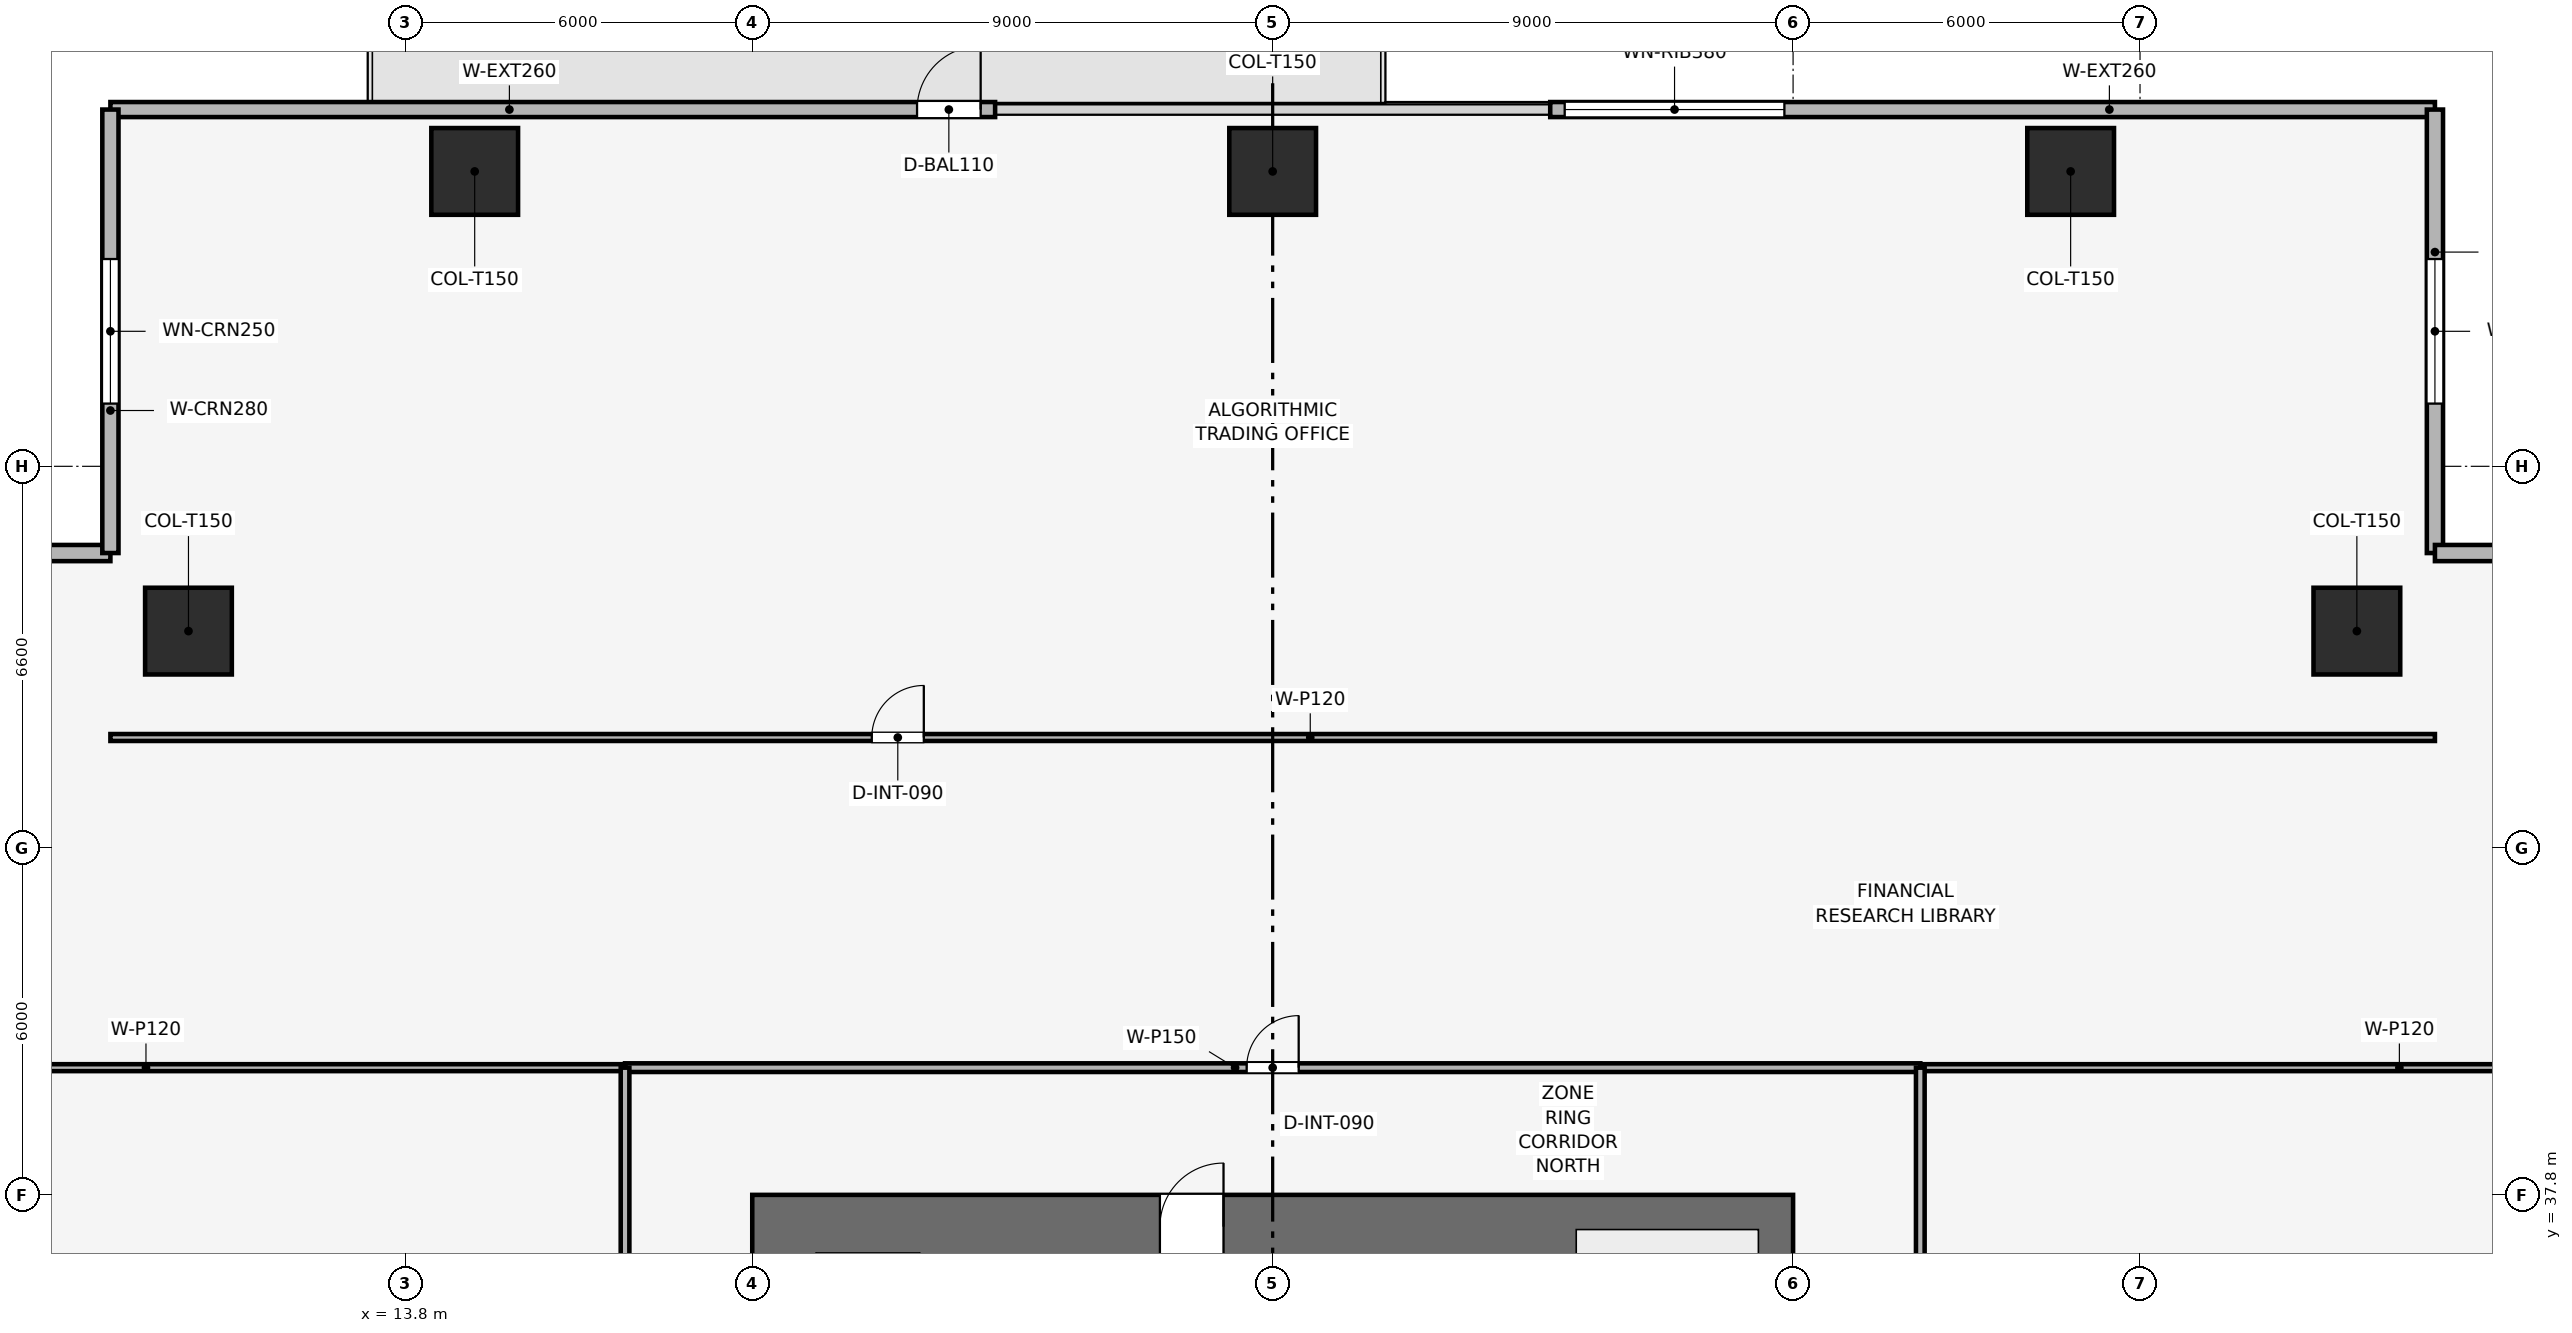
"""IFC4 building model, lengths in metres.
Left out: names, types, materials, properties, quantities, classifications, styles, units other than length and angle.
Written with IfcOpenShell. Run it as: python <this file> out.ifc"""

import sys

from ifc_helpers import new_model, si_unit, direction, frame, frame_2d, origin, origin_2d, place, context, subcontext, project, spatial, rectangle, extrude, element, fill, save


model = new_model("IFC4")
c1 = context("Model", 3, precision=1e-05, world=origin(), true_north=direction((0.0, 1.0)))
c2 = subcontext(c1, "Body", "Model", "MODEL_VIEW")
j1 = project(units=[si_unit("LENGTHUNIT", "METRE"), si_unit("PLANEANGLEUNIT", "RADIAN")], contexts=[c1])
p1 = place(None, origin())
s1 = spatial("IfcSite", under=j1, at=p1, CompositionType="ELEMENT")
p2 = place(p1, origin())
s2 = spatial("IfcBuilding", under=s1, at=p2, CompositionType="ELEMENT")
p3 = place(p2, frame((0.0, 0.0, 92.4)))
s3 = spatial("IfcBuildingStorey", under=s2, at=p3, CompositionType="ELEMENT", Elevation=92.4)
p4 = place(p3, frame((19.8, 37.25, 0.0), z_axis=(0.0, 0.0, 1.0), x_axis=(1.0, 0.0, 0.0)))
e1 = element("IfcWall", 1, at=p4, inside=s3, PredefinedType="SHEAR", context=c2, shape_type="SweptSolid", body=[
    extrude(rectangle(XDim=18.0, YDim=1.1, at=frame_2d((9.0, 0.0))), origin(), (0.0, 0.0, 1.0), 3.9),
])
p5 = place(p4, frame((7.05, 0.0, 0.0)))
e2 = element("IfcOpeningElement", 2, at=p5, cuts=e1, PredefinedType="OPENING", context=c2, shape_type="SweptSolid", body=[
    extrude(rectangle(XDim=1.1, YDim=2.15, at=frame_2d((0.55, 1.075))), frame((0.0, 0.56, 0.0), z_axis=(0.0, -1.0, 0.0), x_axis=(1.0, 0.0, 0.0)), (0.0, 0.0, 1.0), 1.12),
])
for number, where, z_axis, x_axis in (
    (3, (42.6, 55.5, 0.003), (0.0, 0.0, 1.0), (1.0, 0.0, 0.0)),
    (4, (28.8, 55.5, 0.003), (0.0, 0.0, 1.0), (1.0, 0.0, 0.0)),
    (5, (15.0, 55.5, 0.003), (0.0, 0.0, 1.0), (1.0, 0.0, 0.0)),
    (6, (47.55, 47.55, 0.003), (0.0, 0.0, 1.0), (1.0, 0.0, 0.0)),
    (7, (10.05, 47.55, 0.003), (0.0, 0.0, 1.0), (1.0, 0.0, 0.0)),
):
    element("IfcColumn", number, at=place(p3, frame(where, z_axis=z_axis, x_axis=x_axis)), inside=s3, PredefinedType="COLUMN", context=c2, shape_type="SweptSolid", body=[
        extrude(rectangle(XDim=1.5, YDim=1.5, at=origin_2d()), origin(), (0.0, 0.0, 1.0), 3.644),
    ])
p6 = place(p3, frame((8.7, 56.57, 0.0), z_axis=(0.0, 0.0, 1.0), x_axis=(1.0, 0.0, 0.0)))
e8 = element("IfcWall", 8, at=p6, inside=s3, PredefinedType="SOLIDWALL", context=c2, shape_type="SweptSolid", body=[
    extrude(rectangle(XDim=15.3, YDim=0.26, at=frame_2d((7.65, 0.0))), origin(), (0.0, 0.0, 1.0), 3.65),
])
p7 = place(p6, frame((13.95, 0.0, 0.0)))
e9 = element("IfcOpeningElement", 9, at=p7, cuts=e8, PredefinedType="OPENING", context=c2, shape_type="SweptSolid", body=[
    extrude(rectangle(XDim=1.1, YDim=2.2, at=frame_2d((0.55, 1.1))), frame((0.0, 0.14, 0.0), z_axis=(0.0, -1.0, 0.0), x_axis=(1.0, 0.0, 0.0)), (0.0, 0.0, 1.0), 0.28),
])
p8 = place(p3, frame((33.6, 56.57, 0.0), z_axis=(0.0, 0.0, 1.0), x_axis=(1.0, 0.0, 0.0)))
e10 = element("IfcWall", 10, at=p8, inside=s3, PredefinedType="SOLIDWALL", context=c2, shape_type="SweptSolid", body=[
    extrude(rectangle(XDim=15.3, YDim=0.26, at=frame_2d((7.65, 0.0))), origin(), (0.0, 0.0, 1.0), 3.65),
])
p9 = place(p8, frame((0.25, 0.0, 0.9)))
e11 = element("IfcOpeningElement", 11, at=p9, cuts=e10, PredefinedType="OPENING", context=c2, shape_type="SweptSolid", body=[
    extrude(rectangle(XDim=3.8, YDim=1.9, at=frame_2d((1.9, 0.95))), frame((0.0, 0.14, 0.0), z_axis=(0.0, -1.0, 0.0), x_axis=(1.0, 0.0, 0.0)), (0.0, 0.0, 1.0), 0.28),
])
p10 = place(p3, frame((1.03, 48.9, 0.0), z_axis=(0.0, 0.0, 1.0), x_axis=(1.0, 0.0, 0.0)))
e12 = element("IfcWall", 12, at=p10, inside=s3, PredefinedType="SOLIDWALL", context=c2, shape_type="SweptSolid", body=[
    extrude(rectangle(XDim=7.67, YDim=0.28, at=frame_2d((3.835, 0.0))), origin(), (0.0, 0.0, 1.0), 3.65),
])
p11 = place(p10, frame((2.585, 0.0, 0.9)))
e13 = element("IfcOpeningElement", 13, at=p11, cuts=e12, PredefinedType="OPENING", context=c2, shape_type="SweptSolid", body=[
    extrude(rectangle(XDim=2.5, YDim=1.9, at=frame_2d((1.25, 0.95))), frame((0.0, 0.15, 0.0), z_axis=(0.0, -1.0, 0.0), x_axis=(1.0, 0.0, 0.0)), (0.0, 0.0, 1.0), 0.3),
])
p12 = place(p3, frame((8.7, 48.9, 0.0), z_axis=(0.0, 0.0, 1.0), x_axis=(0.0, 1.0, 0.0)))
e14 = element("IfcWall", 14, at=p12, inside=s3, PredefinedType="SOLIDWALL", context=c2, shape_type="SweptSolid", body=[
    extrude(rectangle(XDim=7.67, YDim=0.28, at=frame_2d((3.835, 0.0))), origin(), (0.0, 0.0, 1.0), 3.65),
])
p13 = place(p12, frame((2.585, 0.0, 0.9)))
e15 = element("IfcOpeningElement", 15, at=p13, cuts=e14, PredefinedType="OPENING", context=c2, shape_type="SweptSolid", body=[
    extrude(rectangle(XDim=2.5, YDim=1.9, at=frame_2d((1.25, 0.95))), frame((0.0, 0.15, 0.0), z_axis=(0.0, -1.0, 0.0), x_axis=(1.0, 0.0, 0.0)), (0.0, 0.0, 1.0), 0.3),
])
p14 = place(p3, frame((48.9, 56.57, 0.0), z_axis=(0.0, 0.0, 1.0), x_axis=(0.0, -1.0, 0.0)))
e16 = element("IfcWall", 16, at=p14, inside=s3, PredefinedType="SOLIDWALL", context=c2, shape_type="SweptSolid", body=[
    extrude(rectangle(XDim=7.67, YDim=0.28, at=frame_2d((3.835, 0.0))), origin(), (0.0, 0.0, 1.0), 3.65),
])
p15 = place(p14, frame((2.585, 0.0, 0.9)))
e17 = element("IfcOpeningElement", 17, at=p15, cuts=e16, PredefinedType="OPENING", context=c2, shape_type="SweptSolid", body=[
    extrude(rectangle(XDim=2.5, YDim=1.9, at=frame_2d((1.25, 0.95))), frame((0.0, 0.15, 0.0), z_axis=(0.0, -1.0, 0.0), x_axis=(1.0, 0.0, 0.0)), (0.0, 0.0, 1.0), 0.3),
])
p16 = place(p3, frame((48.9, 48.9, 0.0), z_axis=(0.0, 0.0, 1.0), x_axis=(1.0, 0.0, 0.0)))
e18 = element("IfcWall", 18, at=p16, inside=s3, PredefinedType="SOLIDWALL", context=c2, shape_type="SweptSolid", body=[
    extrude(rectangle(XDim=7.67, YDim=0.28, at=frame_2d((3.835, 0.0))), origin(), (0.0, 0.0, 1.0), 3.65),
])
p17 = place(p16, frame((2.585, 0.0, 0.9)))
e19 = element("IfcOpeningElement", 19, at=p17, cuts=e18, PredefinedType="OPENING", context=c2, shape_type="SweptSolid", body=[
    extrude(rectangle(XDim=2.5, YDim=1.9, at=frame_2d((1.25, 0.95))), frame((0.0, 0.15, 0.0), z_axis=(0.0, -1.0, 0.0), x_axis=(1.0, 0.0, 0.0)), (0.0, 0.0, 1.0), 0.3),
])
p18 = place(p3, frame((8.7, 45.71, 0.0), z_axis=(0.0, 0.0, 1.0), x_axis=(1.0, 0.0, 0.0)))
e20 = element("IfcWall", 20, at=p18, inside=s3, PredefinedType="PARTITIONING", context=c2, shape_type="SweptSolid", body=[
    extrude(rectangle(XDim=40.2, YDim=0.12, at=frame_2d((20.1, 0.0))), origin(), (0.0, 0.0, 1.0), 3.085),
])
p19 = place(p18, frame((13.167, 0.0, 0.0)))
e21 = element("IfcOpeningElement", 21, at=p19, cuts=e20, PredefinedType="OPENING", context=c2, shape_type="SweptSolid", body=[
    extrude(rectangle(XDim=0.9, YDim=2.1, at=frame_2d((0.45, 1.05))), frame((0.0, 0.07, 0.0), z_axis=(0.0, -1.0, 0.0), x_axis=(1.0, 0.0, 0.0)), (0.0, 0.0, 1.0), 0.14),
])
for number, where, z_axis, x_axis in (
    (22, (1.03, 40.0, 0.0), (0.0, 0.0, 1.0), (1.0, 0.0, 0.0)),
    (23, (40.0, 40.0, 0.0), (0.0, 0.0, 1.0), (1.0, 0.0, 0.0)),
):
    element("IfcWall", number, at=place(p3, frame(where, z_axis=z_axis, x_axis=x_axis)), inside=s3, PredefinedType="PARTITIONING", context=c2, shape_type="SweptSolid", body=[
        extrude(rectangle(XDim=16.57, YDim=0.12, at=frame_2d((8.285, 0.0))), origin(), (0.0, 0.0, 1.0), 2.935),
    ])
p20 = place(p3, frame((17.6, 40.0, 0.0), z_axis=(0.0, 0.0, 1.0), x_axis=(1.0, 0.0, 0.0)))
e24 = element("IfcWall", 24, at=p20, inside=s3, PredefinedType="PARTITIONING", context=c2, shape_type="SweptSolid", body=[
    extrude(rectangle(XDim=22.4, YDim=0.15, at=frame_2d((11.2, 0.0))), origin(), (0.0, 0.0, 1.0), 3.085),
])
p21 = place(p20, frame((10.75, 0.0, 0.0)))
e25 = element("IfcOpeningElement", 25, at=p21, cuts=e24, PredefinedType="OPENING", context=c2, shape_type="SweptSolid", body=[
    extrude(rectangle(XDim=0.9, YDim=2.1, at=frame_2d((0.45, 1.05))), frame((0.0, 0.085, 0.0), z_axis=(0.0, -1.0, 0.0), x_axis=(1.0, 0.0, 0.0)), (0.0, 0.0, 1.0), 0.17),
])
p22 = place(p3, frame((17.6, 17.6, 0.0), z_axis=(0.0, 0.0, 1.0), x_axis=(0.0, 1.0, 0.0)))
e26 = element("IfcWall", 26, at=p22, inside=s3, PredefinedType="PARTITIONING", context=c2, shape_type="SweptSolid", body=[
    extrude(rectangle(XDim=22.4, YDim=0.15, at=frame_2d((11.2, 0.0))), origin(), (0.0, 0.0, 1.0), 3.085),
])
p23 = place(p22, frame((0.7, 0.0, 0.0)))
e27 = element("IfcOpeningElement", 27, at=p23, cuts=e26, PredefinedType="OPENING", context=c2, shape_type="SweptSolid", body=[
    extrude(rectangle(XDim=0.9, YDim=2.1, at=frame_2d((0.45, 1.05))), frame((0.0, 0.085, 0.0), z_axis=(0.0, -1.0, 0.0), x_axis=(1.0, 0.0, 0.0)), (0.0, 0.0, 1.0), 0.17),
])
p24 = place(p22, frame((6.365, 0.0, 0.0)))
e28 = element("IfcOpeningElement", 28, at=p24, cuts=e26, PredefinedType="OPENING", context=c2, shape_type="SweptSolid", body=[
    extrude(rectangle(XDim=0.9, YDim=2.1, at=frame_2d((0.45, 1.05))), frame((0.0, 0.085, 0.0), z_axis=(0.0, -1.0, 0.0), x_axis=(1.0, 0.0, 0.0)), (0.0, 0.0, 1.0), 0.17),
])
p25 = place(p22, frame((16.415, 0.0, 0.0)))
e29 = element("IfcOpeningElement", 29, at=p25, cuts=e26, PredefinedType="OPENING", context=c2, shape_type="SweptSolid", body=[
    extrude(rectangle(XDim=0.9, YDim=2.1, at=frame_2d((0.45, 1.05))), frame((0.0, 0.085, 0.0), z_axis=(0.0, -1.0, 0.0), x_axis=(1.0, 0.0, 0.0)), (0.0, 0.0, 1.0), 0.17),
])
p26 = place(p3, frame((40.0, 17.6, 0.0), z_axis=(0.0, 0.0, 1.0), x_axis=(0.0, 1.0, 0.0)))
e30 = element("IfcWall", 30, at=p26, inside=s3, PredefinedType="PARTITIONING", context=c2, shape_type="SweptSolid", body=[
    extrude(rectangle(XDim=22.4, YDim=0.15, at=frame_2d((11.2, 0.0))), origin(), (0.0, 0.0, 1.0), 3.085),
])
p27 = place(p26, frame((0.7, 0.0, 0.0)))
e31 = element("IfcOpeningElement", 31, at=p27, cuts=e30, PredefinedType="OPENING", context=c2, shape_type="SweptSolid", body=[
    extrude(rectangle(XDim=0.9, YDim=2.1, at=frame_2d((0.45, 1.05))), frame((0.0, 0.085, 0.0), z_axis=(0.0, -1.0, 0.0), x_axis=(1.0, 0.0, 0.0)), (0.0, 0.0, 1.0), 0.17),
])
p28 = place(p26, frame((4.699, 0.0, 0.0)))
e32 = element("IfcOpeningElement", 32, at=p28, cuts=e30, PredefinedType="OPENING", context=c2, shape_type="SweptSolid", body=[
    extrude(rectangle(XDim=0.9, YDim=2.1, at=frame_2d((0.45, 1.05))), frame((0.0, 0.085, 0.0), z_axis=(0.0, -1.0, 0.0), x_axis=(1.0, 0.0, 0.0)), (0.0, 0.0, 1.0), 0.17),
])
p29 = place(p26, frame((10.692, 0.0, 0.0)))
e33 = element("IfcOpeningElement", 33, at=p29, cuts=e30, PredefinedType="OPENING", context=c2, shape_type="SweptSolid", body=[
    extrude(rectangle(XDim=0.9, YDim=2.1, at=frame_2d((0.45, 1.05))), frame((0.0, 0.085, 0.0), z_axis=(0.0, -1.0, 0.0), x_axis=(1.0, 0.0, 0.0)), (0.0, 0.0, 1.0), 0.17),
])
p30 = place(p26, frame((17.892, 0.0, 0.0)))
e34 = element("IfcOpeningElement", 34, at=p30, cuts=e30, PredefinedType="OPENING", context=c2, shape_type="SweptSolid", body=[
    extrude(rectangle(XDim=0.9, YDim=2.1, at=frame_2d((0.45, 1.05))), frame((0.0, 0.085, 0.0), z_axis=(0.0, -1.0, 0.0), x_axis=(1.0, 0.0, 0.0)), (0.0, 0.0, 1.0), 0.17),
])
p31 = place(p7, origin())
e35 = element("IfcDoor", 35, at=p31, inside=s3, OperationType="SINGLE_SWING_RIGHT", PredefinedType="DOOR", context=c2, shape_type="SweptSolid", body=[
    extrude(rectangle(XDim=1.1, YDim=2.2, at=frame_2d((0.55, 1.1))), frame((0.0, 0.025, 0.0), z_axis=(0.0, -1.0, 0.0), x_axis=(1.0, 0.0, 0.0)), (0.0, 0.0, 1.0), 0.05),
])
fill(e9, e35)
p32 = place(p9, origin())
e36 = element("IfcWindow", 36, at=p32, inside=s3, PartitioningType="SINGLE_PANEL", PredefinedType="WINDOW", context=c2, shape_type="SweptSolid", body=[
    extrude(rectangle(XDim=3.8, YDim=1.9, at=frame_2d((1.9, 0.95))), frame((0.0, 0.03, 0.0), z_axis=(0.0, -1.0, 0.0), x_axis=(1.0, 0.0, 0.0)), (0.0, 0.0, 1.0), 0.06),
])
fill(e11, e36)
p33 = place(p13, origin())
e37 = element("IfcWindow", 37, at=p33, inside=s3, PartitioningType="SINGLE_PANEL", PredefinedType="WINDOW", context=c2, shape_type="SweptSolid", body=[
    extrude(rectangle(XDim=2.5, YDim=1.9, at=frame_2d((1.25, 0.95))), frame((0.0, 0.03, 0.0), z_axis=(0.0, -1.0, 0.0), x_axis=(1.0, 0.0, 0.0)), (0.0, 0.0, 1.0), 0.06),
])
fill(e15, e37)
p34 = place(p15, origin())
e38 = element("IfcWindow", 38, at=p34, inside=s3, PartitioningType="SINGLE_PANEL", PredefinedType="WINDOW", context=c2, shape_type="SweptSolid", body=[
    extrude(rectangle(XDim=2.5, YDim=1.9, at=frame_2d((1.25, 0.95))), frame((0.0, 0.03, 0.0), z_axis=(0.0, -1.0, 0.0), x_axis=(1.0, 0.0, 0.0)), (0.0, 0.0, 1.0), 0.06),
])
fill(e17, e38)
p35 = place(p19, origin())
e39 = element("IfcDoor", 39, at=p35, inside=s3, OperationType="SINGLE_SWING_RIGHT", PredefinedType="DOOR", context=c2, shape_type="SweptSolid", body=[
    extrude(rectangle(XDim=0.9, YDim=2.1, at=frame_2d((0.45, 1.05))), frame((0.0, 0.025, 0.0), z_axis=(0.0, -1.0, 0.0), x_axis=(1.0, 0.0, 0.0)), (0.0, 0.0, 1.0), 0.05),
])
fill(e21, e39)
p36 = place(p21, origin())
e40 = element("IfcDoor", 40, at=p36, inside=s3, OperationType="SINGLE_SWING_RIGHT", PredefinedType="DOOR", context=c2, shape_type="SweptSolid", body=[
    extrude(rectangle(XDim=0.9, YDim=2.1, at=frame_2d((0.45, 1.05))), frame((0.0, 0.025, 0.0), z_axis=(0.0, -1.0, 0.0), x_axis=(1.0, 0.0, 0.0)), (0.0, 0.0, 1.0), 0.05),
])
fill(e25, e40)
p37 = place(p5, origin())
e41 = element("IfcDoor", 41, at=p37, inside=s3, OperationType="SINGLE_SWING_RIGHT", PredefinedType="DOOR", context=c2, shape_type="SweptSolid", body=[
    extrude(rectangle(XDim=1.1, YDim=2.15, at=frame_2d((0.55, 1.075))), frame((0.0, 0.025, 0.0), z_axis=(0.0, -1.0, 0.0), x_axis=(1.0, 0.0, 0.0)), (0.0, 0.0, 1.0), 0.05),
])
fill(e2, e41)
save(model, sys.argv[1])
